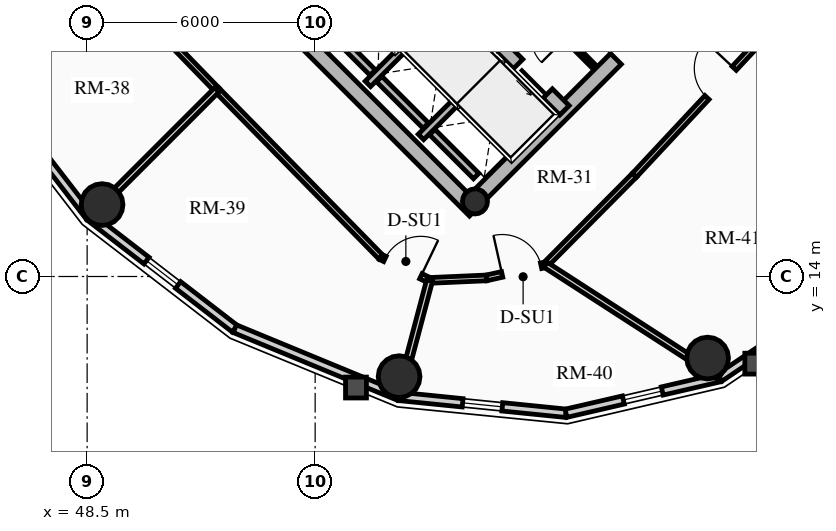
"""IFC4 building model, lengths in metres.
Left out: names, types, materials, properties, quantities, classifications, styles, units other than length and angle.
Written with IfcOpenShell. Run it as: python <this file> out.ifc"""

import sys

from ifc_helpers import new_model, si_unit, direction, frame, frame_2d, origin, origin_2d, place, context, subcontext, project, spatial, rectangle, circle, hollow_circle, extrude, source, transform, mapped, element, fill, save


model = new_model("IFC4")
c1 = context("Model", 3, precision=1e-05, world=origin(), true_north=direction((0.0, 1.0)))
c2 = subcontext(c1, "Body", "Model", "MODEL_VIEW")
j1 = project(units=[si_unit("LENGTHUNIT", "METRE"), si_unit("PLANEANGLEUNIT", "RADIAN")], contexts=[c1])
p1 = place(None, origin())
s1 = spatial("IfcSite", under=j1, at=p1, CompositionType="ELEMENT")
p2 = place(p1, origin())
s2 = spatial("IfcBuilding", under=s1, at=p2, CompositionType="ELEMENT")
p3 = place(p2, frame((0.0, 0.0, 205.39)))
s3 = spatial("IfcBuildingStorey", under=s2, at=p3, CompositionType="ELEMENT", Elevation=205.39)
p4 = place(p3, frame((58.702, 15.732, 0.0), z_axis=(0.0, 0.0, 1.0), x_axis=(-0.707106781187, 0.707106781187, 0.0)))
e1 = element("IfcWall", 1, at=p4, inside=s3, PredefinedType="SHEAR", context=c2, shape_type="SweptSolid", body=[
    extrude(rectangle(XDim=14.1, YDim=0.4, at=frame_2d((7.05, 0.0))), origin(), (0.0, 0.0, 1.0), 2.91),
])
p5 = place(p3, frame((58.561, 15.873, 0.0), z_axis=(0.0, 0.0, 1.0), x_axis=(0.707106781187, 0.707106781187, 0.0)))
e2 = element("IfcWall", 2, at=p5, inside=s3, PredefinedType="SHEAR", context=c2, shape_type="SweptSolid", body=[
    extrude(rectangle(XDim=10.7, YDim=0.4, at=frame_2d((5.35, 0.0))), origin(), (0.0, 0.0, 1.0), 2.91),
])
m1 = source(origin(), c2, "Body", "SweptSolid", [
    extrude(rectangle(XDim=1.5, YDim=2.02, at=frame_2d((0.75, 1.01))), frame((0.0, 0.21, 0.0), z_axis=(0.0, -1.0, 0.0), x_axis=(1.0, 0.0, 0.0)), (0.0, 0.0, 1.0), 0.42),
])
p6 = place(p5, frame((5.45, 0.0, 0.0)))
e3 = element("IfcOpeningElement", 3, at=p6, cuts=e2, PredefinedType="OPENING", context=c2, shape_type="MappedRepresentation", body=[
    mapped(m1, transform((0.0, 0.0, 0.0), x_axis=(1.0, 0.0, 0.0), y_axis=(0.0, 1.0, 0.0), z_axis=(0.0, 0.0, 1.0), scale=1.0)),
])
p7 = place(p3, frame((61.06, 18.373, 0.0), z_axis=(0.0, 0.0, 1.0), x_axis=(-0.707106781187, 0.707106781187, 0.0)))
e4 = element("IfcWall", 4, at=p7, inside=s3, PredefinedType="SHEAR", context=c2, shape_type="SweptSolid", body=[
    extrude(rectangle(XDim=13.7, YDim=0.35, at=frame_2d((6.85, 0.0))), origin(), (0.0, 0.0, 1.0), 2.91),
])
m2 = source(origin(), c2, "Body", "SweptSolid", [
    extrude(rectangle(XDim=1.1, YDim=2.015, at=frame_2d((0.55, 1.007))), frame((0.0, 0.185, 0.0), z_axis=(0.0, -1.0, 0.0), x_axis=(1.0, 0.0, 0.0)), (0.0, 0.0, 1.0), 0.37),
])
p8 = place(p7, frame((4.85, 0.0, 0.0)))
e5 = element("IfcOpeningElement", 5, at=p8, cuts=e4, PredefinedType="OPENING", context=c2, shape_type="MappedRepresentation", body=[
    mapped(m2, transform((0.0, 0.0, 0.0), x_axis=(1.0, 0.0, 0.0), y_axis=(0.0, 1.0, 0.0), z_axis=(0.0, 0.0, 1.0), scale=1.0)),
])
p9 = place(p7, frame((0.625, 0.0, 0.0)))
e6 = element("IfcOpeningElement", 6, at=p9, cuts=e4, PredefinedType="OPENING", context=c2, shape_type="MappedRepresentation", body=[
    mapped(m2, transform((0.0, 0.0, 0.0), x_axis=(1.0, 0.0, 0.0), y_axis=(0.0, 1.0, 0.0), z_axis=(0.0, 0.0, 1.0), scale=1.0)),
])
p10 = place(p7, frame((2.625, 0.0, 0.0)))
e7 = element("IfcOpeningElement", 7, at=p10, cuts=e4, PredefinedType="OPENING", context=c2, shape_type="MappedRepresentation", body=[
    mapped(m2, transform((0.0, 0.0, 0.0), x_axis=(1.0, 0.0, 0.0), y_axis=(0.0, 1.0, 0.0), z_axis=(0.0, 0.0, 1.0), scale=1.0)),
])
m3 = source(origin(), c2, "Body", "SweptSolid", [
    extrude(rectangle(XDim=1.15, YDim=2.02, at=frame_2d((0.575, 1.01))), frame((0.0, 0.185, 0.0), z_axis=(0.0, -1.0, 0.0), x_axis=(1.0, 0.0, 0.0)), (0.0, 0.0, 1.0), 0.37),
])
p11 = place(p7, frame((7.27, 0.0, 0.0)))
e8 = element("IfcOpeningElement", 8, at=p11, cuts=e4, PredefinedType="OPENING", context=c2, shape_type="MappedRepresentation", body=[
    mapped(m3, transform((0.0, 0.0, 0.0), x_axis=(1.0, 0.0, 0.0), y_axis=(0.0, 1.0, 0.0), z_axis=(0.0, 0.0, 1.0), scale=1.0)),
])
p12 = place(p3, frame((58.706, 15.976, 0.0), z_axis=(0.0, 0.0, 1.0), x_axis=(0.707106781187, 0.707106781187, 0.0)))
e9 = element("IfcColumn", 9, at=p12, inside=s3, PredefinedType="COLUMN", context=c2, shape_type="SweptSolid", body=[
    extrude(hollow_circle(Radius=0.33, WallThickness=0.025, at=origin_2d()), origin(), (0.0, 0.0, 1.0), 2.91),
])
for number, where, z_axis, x_axis in (
    (10, (48.893, 15.893, 0.0), (0.0, 0.0, 1.0), (1.0, 0.0, 0.0)),
    (11, (56.709, 11.365, 0.0), (0.0, 0.0, 1.0), (1.0, 0.0, 0.0)),
    (12, (64.827, 11.854, 0.0), (0.0, 0.0, 1.0), (1.0, 0.0, 0.0)),
):
    element("IfcColumn", number, at=place(p3, frame(where, z_axis=z_axis, x_axis=x_axis)), inside=s3, PredefinedType="USERDEFINED", context=c2, shape_type="SweptSolid", body=[
        extrude(circle(Radius=0.55, at=origin_2d()), origin(), (0.0, 0.0, 1.0), 2.91),
    ])
p13 = place(p3, frame((48.569, 15.569, 0.0), z_axis=(0.0, 0.0, 1.0), x_axis=(-0.610523083886, 0.791998462147, 0.0)))
e13 = element("IfcWall", 13, at=p13, inside=s3, PredefinedType="SOLIDWALL", context=c2, shape_type="SweptSolid", body=[
    extrude(rectangle(XDim=4.82, YDim=0.22, at=frame_2d((2.41, 0.0))), origin(), (0.0, 0.0, 1.0), 2.322),
])
p14 = place(p3, frame((52.387, 12.626, 0.0), z_axis=(0.0, 0.0, 1.0), x_axis=(-0.791998462147, 0.610523083886, 0.0)))
e14 = element("IfcWall", 14, at=p14, inside=s3, PredefinedType="SOLIDWALL", context=c2, shape_type="SweptSolid", body=[
    extrude(rectangle(XDim=4.82, YDim=0.22, at=frame_2d((2.41, 0.0))), origin(), (0.0, 0.0, 1.0), 2.322),
])
m4 = source(origin(), c2, "Body", "SweptSolid", [
    extrude(rectangle(XDim=1.05, YDim=1.3, at=frame_2d((0.525, 0.65))), frame((0.0, 0.12, 0.0), z_axis=(0.0, -1.0, 0.0), x_axis=(1.0, 0.0, 0.0)), (0.0, 0.0, 1.0), 0.24),
])
p15 = place(p14, frame((1.885, 0.0, 0.65)))
e15 = element("IfcOpeningElement", 15, at=p15, cuts=e14, PredefinedType="OPENING", context=c2, shape_type="MappedRepresentation", body=[
    mapped(m4, transform((0.0, 0.0, 0.0), x_axis=(1.0, 0.0, 0.0), y_axis=(0.0, 1.0, 0.0), z_axis=(0.0, 0.0, 1.0), scale=1.0)),
])
p16 = place(p3, frame((56.705, 10.845, 0.0), z_axis=(0.0, 0.0, 1.0), x_axis=(-0.924447353237, 0.381309704956, 0.0)))
e16 = element("IfcWall", 16, at=p16, inside=s3, PredefinedType="SOLIDWALL", context=c2, shape_type="SweptSolid", body=[
    extrude(rectangle(XDim=4.671, YDim=0.22, at=frame_2d((2.335, 0.0))), origin(), (0.0, 0.0, 1.0), 2.322),
])
p17 = place(p3, frame((61.1, 10.401, 0.0), z_axis=(0.0, 0.0, 1.0), x_axis=(-0.994929930991, 0.100570534541, 0.0)))
e17 = element("IfcWall", 17, at=p17, inside=s3, PredefinedType="SOLIDWALL", context=c2, shape_type="SweptSolid", body=[
    extrude(rectangle(XDim=4.418, YDim=0.22, at=frame_2d((2.209, 0.0))), origin(), (0.0, 0.0, 1.0), 2.322),
])
p18 = place(p17, frame((1.684, 0.0, 0.65)))
e18 = element("IfcOpeningElement", 18, at=p18, cuts=e17, PredefinedType="OPENING", context=c2, shape_type="MappedRepresentation", body=[
    mapped(m4, transform((0.0, 0.0, 0.0), x_axis=(1.0, 0.0, 0.0), y_axis=(0.0, 1.0, 0.0), z_axis=(0.0, 0.0, 1.0), scale=1.0)),
])
p19 = place(p3, frame((65.144, 11.337, 0.0), z_axis=(0.0, 0.0, 1.0), x_axis=(-0.974249228678, -0.225473813158, 0.0)))
e19 = element("IfcWall", 19, at=p19, inside=s3, PredefinedType="SOLIDWALL", context=c2, shape_type="SweptSolid", body=[
    extrude(rectangle(XDim=4.15, YDim=0.22, at=frame_2d((2.075, 0.0))), origin(), (0.0, 0.0, 1.0), 2.322),
])
p20 = place(p19, frame((1.55, 0.0, 0.65)))
e20 = element("IfcOpeningElement", 20, at=p20, cuts=e19, PredefinedType="OPENING", context=c2, shape_type="MappedRepresentation", body=[
    mapped(m4, transform((0.0, 0.0, 0.0), x_axis=(1.0, 0.0, 0.0), y_axis=(0.0, 1.0, 0.0), z_axis=(0.0, 0.0, 1.0), scale=1.0)),
])
p21 = place(p3, frame((68.439, 13.561, 0.0), z_axis=(0.0, 0.0, 1.0), x_axis=(-0.828833723692, -0.559495003079, 0.0)))
e21 = element("IfcWall", 21, at=p21, inside=s3, PredefinedType="SOLIDWALL", context=c2, shape_type="SweptSolid", body=[
    extrude(rectangle(XDim=3.976, YDim=0.22, at=frame_2d((1.988, 0.0))), origin(), (0.0, 0.0, 1.0), 2.322),
])
p22 = place(p3, frame((55.888, 19.069, 0.0), z_axis=(0.0, 0.0, 1.0), x_axis=(0.707106781187, 0.707106781187, 0.0)))
e22 = element("IfcWall", 22, at=p22, inside=s3, PredefinedType="SHEAR", context=c2, shape_type="SweptSolid", body=[
    extrude(rectangle(XDim=2.97, YDim=0.2, at=frame_2d((1.485, 0.0))), origin(), (0.0, 0.0, 1.0), 2.91),
])
p23 = place(p3, frame((56.015, 19.366, 0.0), z_axis=(0.0, 0.0, 1.0), x_axis=(-0.707106781187, 0.707106781187, 0.0)))
e23 = element("IfcWall", 23, at=p23, inside=s3, PredefinedType="SHEAR", context=c2, shape_type="SweptSolid", body=[
    extrude(rectangle(XDim=2.44, YDim=0.2, at=frame_2d((1.22, 0.0))), origin(), (0.0, 0.0, 1.0), 2.91),
])
p24 = place(p3, frame((57.284, 17.673, 0.0), z_axis=(0.0, 0.0, 1.0), x_axis=(0.707147878904, 0.70706568108, 0.0)))
e24 = element("IfcWall", 24, at=p24, inside=s3, PredefinedType="SHEAR", context=c2, shape_type="SweptSolid", body=[
    extrude(rectangle(XDim=2.97, YDim=0.2, at=frame_2d((1.485, 0.0))), origin(), (0.0, 0.0, 1.0), 2.91),
])
p25 = place(p3, frame((57.412, 17.97, 0.0), z_axis=(0.0, 0.0, 1.0), x_axis=(-0.707106781187, 0.707106781187, 0.0)))
e25 = element("IfcWall", 25, at=p25, inside=s3, PredefinedType="SHEAR", context=c2, shape_type="SweptSolid", body=[
    extrude(rectangle(XDim=1.735, YDim=0.2, at=frame_2d((0.867, 0.0))), origin(), (0.0, 0.0, 1.0), 2.91),
])
p26 = place(p3, frame((58.737, 16.644, 0.0), z_axis=(0.0, 0.0, 1.0), x_axis=(-0.707032117043, 0.707181437447, 0.0)))
e26 = element("IfcWall", 26, at=p26, inside=s3, PredefinedType="SHEAR", context=c2, shape_type="SweptSolid", body=[
    extrude(rectangle(XDim=1.635, YDim=0.2, at=frame_2d((0.817, 0.0))), origin(), (0.0, 0.0, 1.0), 2.91),
])
p27 = place(p3, frame((61.835, 19.529, 0.0), z_axis=(0.0, 0.0, 1.0), x_axis=(-0.707146413884, 0.707067146267, 0.0)))
e27 = element("IfcWall", 27, at=p27, inside=s3, PredefinedType="PARTITIONING", context=c2, shape_type="SweptSolid", body=[
    extrude(rectangle(XDim=3.08, YDim=0.125, at=frame_2d((1.54, 0.0))), origin(), (0.0, 0.0, 1.0), 2.685),
])
m5 = source(origin(), c2, "Body", "SweptSolid", [
    extrude(rectangle(XDim=0.9, YDim=2.005, at=frame_2d((0.45, 1.002))), frame((0.0, 0.073, 0.0), z_axis=(0.0, -1.0, 0.0), x_axis=(1.0, 0.0, 0.0)), (0.0, 0.0, 1.0), 0.145),
])
p28 = place(p27, frame((1.05, 0.0, 0.0)))
e28 = element("IfcOpeningElement", 28, at=p28, cuts=e27, PredefinedType="OPENING", context=c2, shape_type="MappedRepresentation", body=[
    mapped(m5, transform((0.0, 0.0, 0.0), x_axis=(1.0, 0.0, 0.0), y_axis=(0.0, 1.0, 0.0), z_axis=(0.0, 0.0, 1.0), scale=1.0)),
])
p29 = place(p3, frame((47.706, 23.253, 0.0), z_axis=(0.0, 0.0, 1.0), x_axis=(0.696179266346, -0.717867974707, 0.0)))
e29 = element("IfcWall", 29, at=p29, inside=s3, PredefinedType="PARTITIONING", context=c2, shape_type="SweptSolid", body=[
    extrude(rectangle(XDim=6.045, YDim=0.15, at=frame_2d((3.022, 0.0))), origin(), (0.0, 0.0, 1.0), 2.255),
])
p30 = place(p3, frame((51.914, 18.914, 0.0), z_axis=(0.0, 0.0, 1.0), x_axis=(0.699999313799, -0.714143515465, 0.0)))
e30 = element("IfcWall", 30, at=p30, inside=s3, PredefinedType="PARTITIONING", context=c2, shape_type="SweptSolid", body=[
    extrude(rectangle(XDim=6.162, YDim=0.15, at=frame_2d((3.081, 0.0))), origin(), (0.0, 0.0, 1.0), 2.255),
])
p31 = place(p3, frame((56.227, 14.513, 0.0), z_axis=(0.0, 0.0, 1.0), x_axis=(0.901477579283, -0.432825801044, 0.0)))
e31 = element("IfcWall", 31, at=p31, inside=s3, PredefinedType="PARTITIONING", context=c2, shape_type="SweptSolid", body=[
    extrude(rectangle(XDim=1.424, YDim=0.15, at=frame_2d((0.712, 0.0))), origin(), (0.0, 0.0, 1.0), 2.255),
])
m6 = source(origin(), c2, "Body", "SweptSolid", [
    extrude(rectangle(XDim=1.05, YDim=2.015, at=frame_2d((0.525, 1.007))), frame((0.0, 0.085, 0.0), z_axis=(0.0, -1.0, 0.0), x_axis=(1.0, 0.0, 0.0)), (0.0, 0.0, 1.0), 0.17),
])
p32 = place(p31, frame((0.12, 0.0, 0.0)))
e32 = element("IfcOpeningElement", 32, at=p32, cuts=e31, PredefinedType="OPENING", context=c2, shape_type="MappedRepresentation", body=[
    mapped(m6, transform((0.0, 0.0, 0.0), x_axis=(1.0, 0.0, 0.0), y_axis=(0.0, 1.0, 0.0), z_axis=(0.0, 0.0, 1.0), scale=1.0)),
])
p33 = place(p3, frame((57.511, 13.897, 0.0), z_axis=(0.0, 0.0, 1.0), x_axis=(0.999024538494, 0.044158481476, 0.0)))
e33 = element("IfcWall", 33, at=p33, inside=s3, PredefinedType="PARTITIONING", context=c2, shape_type="SweptSolid", body=[
    extrude(rectangle(XDim=1.498, YDim=0.15, at=frame_2d((0.749, 0.0))), origin(), (0.0, 0.0, 1.0), 2.322),
])
p34 = place(p3, frame((59.008, 13.963, 0.0), z_axis=(0.0, 0.0, 1.0), x_axis=(0.976020856791, 0.21767702476, 0.0)))
e34 = element("IfcWall", 34, at=p34, inside=s3, PredefinedType="PARTITIONING", context=c2, shape_type="SweptSolid", body=[
    extrude(rectangle(XDim=1.593, YDim=0.15, at=frame_2d((0.796, 0.0))), origin(), (0.0, 0.0, 1.0), 2.255),
])
p35 = place(p34, frame((0.423, 0.0, 0.0)))
e35 = element("IfcOpeningElement", 35, at=p35, cuts=e34, PredefinedType="OPENING", context=c2, shape_type="MappedRepresentation", body=[
    mapped(m6, transform((0.0, 0.0, 0.0), x_axis=(1.0, 0.0, 0.0), y_axis=(0.0, 1.0, 0.0), z_axis=(0.0, 0.0, 1.0), scale=1.0)),
])
p36 = place(p3, frame((60.562, 14.31, 0.0), z_axis=(0.0, 0.0, 1.0), x_axis=(0.704566236161, 0.709638230975, 0.0)))
e36 = element("IfcWall", 36, at=p36, inside=s3, PredefinedType="PARTITIONING", context=c2, shape_type="SweptSolid", body=[
    extrude(rectangle(XDim=3.321, YDim=0.15, at=frame_2d((1.661, 0.0))), origin(), (0.0, 0.0, 1.0), 2.322),
])
p37 = place(p3, frame((62.903, 16.667, 0.0), z_axis=(0.0, 0.0, 1.0), x_axis=(0.682371947497, 0.731005147225, 0.0)))
e37 = element("IfcWall", 37, at=p37, inside=s3, PredefinedType="PARTITIONING", context=c2, shape_type="SweptSolid", body=[
    extrude(rectangle(XDim=6.642, YDim=0.15, at=frame_2d((3.321, 0.0))), origin(), (0.0, 0.0, 1.0), 2.255),
])
p38 = place(p37, frame((2.796, 0.0, 0.0)))
e38 = element("IfcOpeningElement", 38, at=p38, cuts=e37, PredefinedType="OPENING", context=c2, shape_type="MappedRepresentation", body=[
    mapped(m6, transform((0.0, 0.0, 0.0), x_axis=(1.0, 0.0, 0.0), y_axis=(0.0, 1.0, 0.0), z_axis=(0.0, 0.0, 1.0), scale=1.0)),
])
p39 = place(p3, frame((51.914, 18.914, 0.0), z_axis=(0.0, 0.0, 1.0), x_axis=(-0.707106781187, -0.707106781187, 0.0)))
e39 = element("IfcWall", 39, at=p39, inside=s3, PredefinedType="PARTITIONING", context=c2, shape_type="SweptSolid", body=[
    extrude(rectangle(XDim=4.71, YDim=0.16, at=frame_2d((2.355, 0.0))), origin(), (0.0, 0.0, 1.0), 2.322),
])
p40 = place(p3, frame((57.511, 13.897, 0.0), z_axis=(0.0, 0.0, 1.0), x_axis=(-0.256174967125, -0.966630428974, 0.0)))
e40 = element("IfcWall", 40, at=p40, inside=s3, PredefinedType="PARTITIONING", context=c2, shape_type="SweptSolid", body=[
    extrude(rectangle(XDim=3.136, YDim=0.16, at=frame_2d((1.568, 0.0))), origin(), (0.0, 0.0, 1.0), 2.322),
])
p41 = place(p3, frame((60.562, 14.31, 0.0), z_axis=(0.0, 0.0, 1.0), x_axis=(0.839858797161, -0.542804938105, 0.0)))
e41 = element("IfcWall", 41, at=p41, inside=s3, PredefinedType="PARTITIONING", context=c2, shape_type="SweptSolid", body=[
    extrude(rectangle(XDim=5.444, YDim=0.16, at=frame_2d((2.722, 0.0))), origin(), (0.0, 0.0, 1.0), 2.322),
])
p42 = place(p3, frame((47.706, 23.253, 0.0), z_axis=(0.0, 0.0, 1.0), x_axis=(-0.471384756618, -0.881927667799, 0.0)))
e42 = element("IfcWall", 42, at=p42, inside=s3, PredefinedType="PARTITIONING", context=c2, shape_type="SweptSolid", body=[
    extrude(rectangle(XDim=4.374, YDim=0.125, at=frame_2d((2.187, 0.0))), origin(), (0.0, 0.0, 1.0), 2.255),
])
p43 = place(p42, frame((1.674, 0.0, 0.0)))
e43 = element("IfcOpeningElement", 43, at=p43, cuts=e42, PredefinedType="OPENING", context=c2, shape_type="MappedRepresentation", body=[
    mapped(m5, transform((0.0, 0.0, 0.0), x_axis=(1.0, 0.0, 0.0), y_axis=(0.0, 1.0, 0.0), z_axis=(0.0, 0.0, 1.0), scale=1.0)),
])
m7 = source(origin(), c2, "Body", "SweptSolid", [
    extrude(rectangle(XDim=1.05, YDim=1.3, at=frame_2d((0.525, 0.65))), frame((0.0, 0.03, 0.0), z_axis=(0.0, -1.0, 0.0), x_axis=(1.0, 0.0, 0.0)), (0.0, 0.0, 1.0), 0.06),
])
p44 = place(p15, origin())
e44 = element("IfcWindow", 44, at=p44, inside=s3, PartitioningType="SINGLE_PANEL", PredefinedType="WINDOW", context=c2, shape_type="MappedRepresentation", body=[
    mapped(m7, transform((0.0, 0.0, 0.0), x_axis=(1.0, 0.0, 0.0), y_axis=(0.0, 1.0, 0.0), z_axis=(0.0, 0.0, 1.0), scale=1.0)),
])
fill(e15, e44)
p45 = place(p18, origin())
e45 = element("IfcWindow", 45, at=p45, inside=s3, PartitioningType="SINGLE_PANEL", PredefinedType="WINDOW", context=c2, shape_type="MappedRepresentation", body=[
    mapped(m7, transform((0.0, 0.0, 0.0), x_axis=(1.0, 0.0, 0.0), y_axis=(0.0, 1.0, 0.0), z_axis=(0.0, 0.0, 1.0), scale=1.0)),
])
fill(e18, e45)
p46 = place(p20, origin())
e46 = element("IfcWindow", 46, at=p46, inside=s3, PartitioningType="SINGLE_PANEL", PredefinedType="WINDOW", context=c2, shape_type="MappedRepresentation", body=[
    mapped(m7, transform((0.0, 0.0, 0.0), x_axis=(1.0, 0.0, 0.0), y_axis=(0.0, 1.0, 0.0), z_axis=(0.0, 0.0, 1.0), scale=1.0)),
])
fill(e20, e46)
m8 = source(origin(), c2, "Body", "SweptSolid", [
    extrude(rectangle(XDim=1.1, YDim=2.015, at=frame_2d((0.55, 1.007))), frame((0.0, 0.025, 0.0), z_axis=(0.0, -1.0, 0.0), x_axis=(1.0, 0.0, 0.0)), (0.0, 0.0, 1.0), 0.05),
])
p47 = place(p9, origin())
e47 = element("IfcDoor", 47, at=p47, inside=s3, OperationType="SLIDING_TO_LEFT", PredefinedType="DOOR", context=c2, shape_type="MappedRepresentation", body=[
    mapped(m8, transform((0.0, 0.0, 0.0), x_axis=(1.0, 0.0, 0.0), y_axis=(0.0, 1.0, 0.0), z_axis=(0.0, 0.0, 1.0), scale=1.0)),
])
fill(e6, e47)
m9 = source(origin(), c2, "Body", "SweptSolid", [
    extrude(rectangle(XDim=1.5, YDim=2.02, at=frame_2d((0.75, 1.01))), frame((0.0, 0.025, 0.0), z_axis=(0.0, -1.0, 0.0), x_axis=(1.0, 0.0, 0.0)), (0.0, 0.0, 1.0), 0.05),
])
p48 = place(p6, origin())
e48 = element("IfcDoor", 48, at=p48, inside=s3, OperationType="DOUBLE_DOOR_SINGLE_SWING", PredefinedType="DOOR", context=c2, shape_type="MappedRepresentation", body=[
    mapped(m9, transform((0.0, 0.0, 0.0), x_axis=(1.0, 0.0, 0.0), y_axis=(0.0, 1.0, 0.0), z_axis=(0.0, 0.0, 1.0), scale=1.0)),
])
fill(e3, e48)
m10 = source(origin(), c2, "Body", "SweptSolid", [
    extrude(rectangle(XDim=1.05, YDim=2.015, at=frame_2d((0.525, 1.007))), frame((0.0, 0.025, 0.0), z_axis=(0.0, -1.0, 0.0), x_axis=(1.0, 0.0, 0.0)), (0.0, 0.0, 1.0), 0.05),
])
p49 = place(p32, origin())
e49 = element("IfcDoor", 49, at=p49, inside=s3, OperationType="SINGLE_SWING_RIGHT", PredefinedType="DOOR", context=c2, shape_type="MappedRepresentation", body=[
    mapped(m10, transform((0.0, 0.0, 0.0), x_axis=(1.0, 0.0, 0.0), y_axis=(0.0, 1.0, 0.0), z_axis=(0.0, 0.0, 1.0), scale=1.0)),
])
fill(e32, e49)
p50 = place(p35, origin())
e50 = element("IfcDoor", 50, at=p50, inside=s3, OperationType="SINGLE_SWING_LEFT", PredefinedType="DOOR", context=c2, shape_type="MappedRepresentation", body=[
    mapped(m10, transform((0.0, 0.0, 0.0), x_axis=(1.0, 0.0, 0.0), y_axis=(0.0, 1.0, 0.0), z_axis=(0.0, 0.0, 1.0), scale=1.0)),
])
fill(e35, e50)
p51 = place(p38, origin())
e51 = element("IfcDoor", 51, at=p51, inside=s3, OperationType="SINGLE_SWING_RIGHT", PredefinedType="DOOR", context=c2, shape_type="MappedRepresentation", body=[
    mapped(m10, transform((0.0, 0.0, 0.0), x_axis=(1.0, 0.0, 0.0), y_axis=(0.0, 1.0, 0.0), z_axis=(0.0, 0.0, 1.0), scale=1.0)),
])
fill(e38, e51)
save(model, sys.argv[1])
